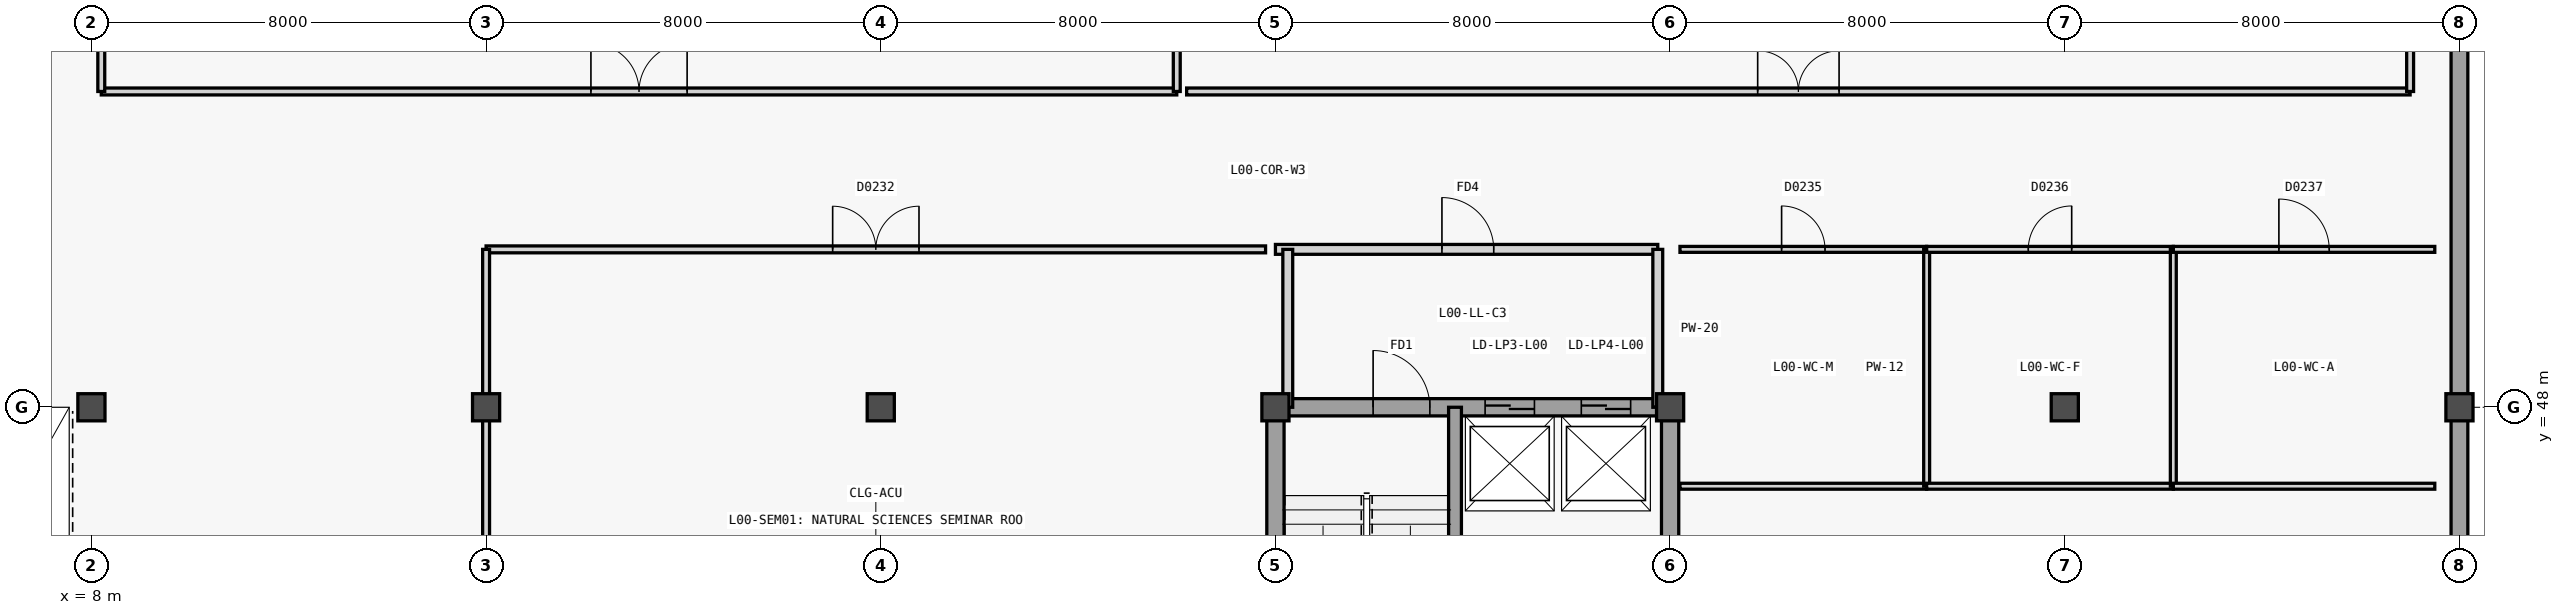
"""IFC4 building model, lengths in metres.
Left out: names, types, materials, properties, quantities, classifications, styles, units other than length and angle.
Written with IfcOpenShell. Run it as: python <this file> out.ifc"""

import sys

from ifc_helpers import new_model, si_unit, direction, frame, frame_2d, origin, origin_2d, place, context, subcontext, project, spatial, rectangle, extrude, element, fill, save


model = new_model("IFC4")
c1 = context("Model", 3, precision=1e-05, world=origin(), true_north=direction((0.0, 1.0)))
c2 = subcontext(c1, "Body", "Model", "MODEL_VIEW")
j1 = project(units=[si_unit("LENGTHUNIT", "METRE"), si_unit("PLANEANGLEUNIT", "RADIAN")], contexts=[c1])
p1 = place(None, origin())
s1 = spatial("IfcSite", under=j1, at=p1, CompositionType="ELEMENT")
p2 = place(p1, origin())
s2 = spatial("IfcBuilding", under=s1, at=p2, CompositionType="ELEMENT")
p3 = place(p2, origin())
s3 = spatial("IfcBuildingStorey", under=s2, at=p3, CompositionType="ELEMENT", Elevation=0.0)
for number, where, z_axis, x_axis in (
    (1, (8.0, 48.0, 0.0), (0.0, 0.0, 1.0), (1.0, 0.0, 0.0)),
    (2, (16.0, 48.0, 0.0), (0.0, 0.0, 1.0), (1.0, 0.0, 0.0)),
    (3, (24.0, 48.0, 0.0), (0.0, 0.0, 1.0), (1.0, 0.0, 0.0)),
    (4, (32.0, 48.0, 0.0), (0.0, 0.0, 1.0), (1.0, 0.0, 0.0)),
    (5, (40.0, 48.0, 0.0), (0.0, 0.0, 1.0), (1.0, 0.0, 0.0)),
    (6, (48.0, 48.0, 0.0), (0.0, 0.0, 1.0), (1.0, 0.0, 0.0)),
    (7, (56.0, 48.0, 0.0), (0.0, 0.0, 1.0), (1.0, 0.0, 0.0)),
):
    element("IfcColumn", number, at=place(p3, frame(where, z_axis=z_axis, x_axis=x_axis)), inside=s3, PredefinedType="COLUMN", context=c2, shape_type="SweptSolid", body=[
        extrude(rectangle(XDim=0.55, YDim=0.55, at=origin_2d()), origin(), (0.0, 0.0, 1.0), 5.4),
    ])
p4 = place(p3, frame((56.0, 64.0, 0.0), z_axis=(0.0, 0.0, 1.0), x_axis=(0.0, -1.0, 0.0)))
e8 = element("IfcWall", 8, at=p4, inside=s3, PredefinedType="SOLIDWALL", context=c2, shape_type="SweptSolid", body=[
    extrude(rectangle(XDim=64.0, YDim=0.34, at=frame_2d((32.0, 0.0))), origin(), (0.0, 0.0, 1.0), 5.16),
])
for number, where, z_axis, x_axis in (
    (9, (32.0, 40.0, 0.0), (0.0, 0.0, 1.0), (0.0, 1.0, 0.0)),
    (10, (40.0, 40.0, 0.0), (0.0, 0.0, 1.0), (0.0, 1.0, 0.0)),
):
    element("IfcWall", number, at=place(p3, frame(where, z_axis=z_axis, x_axis=x_axis)), inside=s3, PredefinedType="SHEAR", context=c2, shape_type="SweptSolid", body=[
        extrude(rectangle(XDim=8.0, YDim=0.35, at=frame_2d((4.0, 0.0))), origin(), (0.0, 0.0, 1.0), 5.4),
    ])
p5 = place(p3, frame((32.0, 48.0, 0.0), z_axis=(0.0, 0.0, 1.0), x_axis=(1.0, 0.0, 0.0)))
e11 = element("IfcWall", 11, at=p5, inside=s3, PredefinedType="SHEAR", context=c2, shape_type="SweptSolid", body=[
    extrude(rectangle(XDim=8.0, YDim=0.35, at=frame_2d((4.0, 0.0))), origin(), (0.0, 0.0, 1.0), 5.4),
])
p6 = place(p5, frame((1.98, 0.0, 0.0)))
e12 = element("IfcOpeningElement", 12, at=p6, cuts=e11, PredefinedType="OPENING", context=c2, shape_type="SweptSolid", body=[
    extrude(rectangle(XDim=1.15, YDim=2.2, at=frame_2d((0.575, 1.1))), frame((0.0, 0.185, 0.0), z_axis=(0.0, -1.0, 0.0), x_axis=(1.0, 0.0, 0.0)), (0.0, 0.0, 1.0), 0.37),
])
p7 = place(p5, frame((4.25, 0.0, 0.0)))
e13 = element("IfcOpeningElement", 13, at=p7, cuts=e11, PredefinedType="OPENING", context=c2, shape_type="SweptSolid", body=[
    extrude(rectangle(XDim=1.0, YDim=2.15, at=frame_2d((0.5, 1.075))), frame((0.0, 0.185, 0.0), z_axis=(0.0, -1.0, 0.0), x_axis=(1.0, 0.0, 0.0)), (0.0, 0.0, 1.0), 0.37),
])
p8 = place(p5, frame((6.2, 0.0, 0.0)))
e14 = element("IfcOpeningElement", 14, at=p8, cuts=e11, PredefinedType="OPENING", context=c2, shape_type="SweptSolid", body=[
    extrude(rectangle(XDim=1.0, YDim=2.15, at=frame_2d((0.5, 1.075))), frame((0.0, 0.185, 0.0), z_axis=(0.0, -1.0, 0.0), x_axis=(1.0, 0.0, 0.0)), (0.0, 0.0, 1.0), 0.37),
])
p9 = place(p3, frame((35.64, 40.0, 0.0), z_axis=(0.0, 0.0, 1.0), x_axis=(0.0, 1.0, 0.0)))
e15 = element("IfcWall", 15, at=p9, inside=s3, PredefinedType="SHEAR", context=c2, shape_type="SweptSolid", body=[
    extrude(rectangle(XDim=8.0, YDim=0.26, at=frame_2d((4.0, 0.0))), origin(), (0.0, 0.0, 1.0), 5.4),
])
p10 = place(p3, frame((32.0, 51.2, 0.0), z_axis=(0.0, 0.0, 1.0), x_axis=(1.0, 0.0, 0.0)))
e16 = element("IfcWall", 16, at=p10, inside=s3, PredefinedType="PARTITIONING", context=c2, shape_type="SweptSolid", body=[
    extrude(rectangle(XDim=7.75, YDim=0.2, at=frame_2d((3.875, 0.0))), origin(), (0.0, 0.0, 1.0), 5.12),
])
p11 = place(p10, frame((3.375, 0.0, 0.0)))
e17 = element("IfcOpeningElement", 17, at=p11, cuts=e16, PredefinedType="OPENING", context=c2, shape_type="SweptSolid", body=[
    extrude(rectangle(XDim=1.05, YDim=2.15, at=frame_2d((0.525, 1.075))), frame((0.0, 0.11, 0.0), z_axis=(0.0, -1.0, 0.0), x_axis=(1.0, 0.0, 0.0)), (0.0, 0.0, 1.0), 0.22),
])
for number, where, z_axis, x_axis in (
    (18, (39.75, 48.0, 0.0), (0.0, 0.0, 1.0), (0.0, 1.0, 0.0)),
    (19, (32.25, 48.0, 0.0), (0.0, 0.0, 1.0), (0.0, 1.0, 0.0)),
):
    element("IfcWall", number, at=place(p3, frame(where, z_axis=z_axis, x_axis=x_axis)), inside=s3, PredefinedType="PARTITIONING", context=c2, shape_type="SweptSolid", body=[
        extrude(rectangle(XDim=3.2, YDim=0.2, at=frame_2d((1.6, 0.0))), origin(), (0.0, 0.0, 1.0), 4.47),
    ])
p12 = place(p3, frame((16.0, 51.2, 0.0), z_axis=(0.0, 0.0, 1.0), x_axis=(1.0, 0.0, 0.0)))
e20 = element("IfcWall", 20, at=p12, inside=s3, PredefinedType="PARTITIONING", context=c2, shape_type="SweptSolid", body=[
    extrude(rectangle(XDim=15.8, YDim=0.14, at=frame_2d((7.9, 0.0))), origin(), (0.0, 0.0, 1.0), 5.14),
])
p13 = place(p12, frame((7.025, 0.0, 0.0)))
e21 = element("IfcOpeningElement", 21, at=p13, cuts=e20, PredefinedType="OPENING", context=c2, shape_type="SweptSolid", body=[
    extrude(rectangle(XDim=1.75, YDim=2.2, at=frame_2d((0.875, 1.1))), frame((0.0, 0.08, 0.0), z_axis=(0.0, -1.0, 0.0), x_axis=(1.0, 0.0, 0.0)), (0.0, 0.0, 1.0), 0.16),
])
p14 = place(p3, frame((16.0, 40.2, 0.0), z_axis=(0.0, 0.0, 1.0), x_axis=(0.0, 1.0, 0.0)))
e22 = element("IfcWall", 22, at=p14, inside=s3, PredefinedType="PARTITIONING", context=c2, shape_type="SweptSolid", body=[
    extrude(rectangle(XDim=11.0, YDim=0.14, at=frame_2d((5.5, 0.0))), origin(), (0.0, 0.0, 1.0), 4.47),
])
p15 = place(p3, frame((8.2, 54.4, 0.0), z_axis=(0.0, 0.0, 1.0), x_axis=(1.0, 0.0, 0.0)))
e23 = element("IfcWall", 23, at=p15, inside=s3, PredefinedType="PARTITIONING", context=c2, shape_type="SweptSolid", body=[
    extrude(rectangle(XDim=21.8, YDim=0.14, at=frame_2d((10.9, 0.0))), origin(), (0.0, 0.0, 1.0), 5.14),
])
p16 = place(p15, frame((9.925, 0.0, 0.0)))
e24 = element("IfcOpeningElement", 24, at=p16, cuts=e23, PredefinedType="OPENING", context=c2, shape_type="SweptSolid", body=[
    extrude(rectangle(XDim=1.95, YDim=2.35, at=frame_2d((0.975, 1.175))), frame((0.0, 0.08, 0.0), z_axis=(0.0, -1.0, 0.0), x_axis=(1.0, 0.0, 0.0)), (0.0, 0.0, 1.0), 0.16),
])
p17 = place(p3, frame((8.2, 54.4, 0.0), z_axis=(0.0, 0.0, 1.0), x_axis=(0.0, 1.0, 0.0)))
e25 = element("IfcWall", 25, at=p17, inside=s3, PredefinedType="PARTITIONING", context=c2, shape_type="SweptSolid", body=[
    extrude(rectangle(XDim=8.6, YDim=0.14, at=frame_2d((4.3, 0.0))), origin(), (0.0, 0.0, 1.0), 4.47),
])
p18 = place(p3, frame((30.0, 54.4, 0.0), z_axis=(0.0, 0.0, 1.0), x_axis=(0.0, 1.0, 0.0)))
e26 = element("IfcWall", 26, at=p18, inside=s3, PredefinedType="PARTITIONING", context=c2, shape_type="SweptSolid", body=[
    extrude(rectangle(XDim=8.6, YDim=0.14, at=frame_2d((4.3, 0.0))), origin(), (0.0, 0.0, 1.0), 5.14),
])
p19 = place(p3, frame((30.2, 54.4, 0.0), z_axis=(0.0, 0.0, 1.0), x_axis=(1.0, 0.0, 0.0)))
e27 = element("IfcWall", 27, at=p19, inside=s3, PredefinedType="PARTITIONING", context=c2, shape_type="SweptSolid", body=[
    extrude(rectangle(XDim=24.8, YDim=0.14, at=frame_2d((12.4, 0.0))), origin(), (0.0, 0.0, 1.0), 5.14),
])
p20 = place(p19, frame((11.575, 0.0, 0.0)))
e28 = element("IfcOpeningElement", 28, at=p20, cuts=e27, PredefinedType="OPENING", context=c2, shape_type="SweptSolid", body=[
    extrude(rectangle(XDim=1.65, YDim=2.3, at=frame_2d((0.825, 1.15))), frame((0.0, 0.08, 0.0), z_axis=(0.0, -1.0, 0.0), x_axis=(1.0, 0.0, 0.0)), (0.0, 0.0, 1.0), 0.16),
])
p21 = place(p3, frame((55.0, 54.4, 0.0), z_axis=(0.0, 0.0, 1.0), x_axis=(0.0, 1.0, 0.0)))
e29 = element("IfcWall", 29, at=p21, inside=s3, PredefinedType="PARTITIONING", context=c2, shape_type="SweptSolid", body=[
    extrude(rectangle(XDim=8.6, YDim=0.14, at=frame_2d((4.3, 0.0))), origin(), (0.0, 0.0, 1.0), 5.14),
])
p22 = place(p3, frame((40.2, 46.4, 0.0), z_axis=(0.0, 0.0, 1.0), x_axis=(1.0, 0.0, 0.0)))
e30 = element("IfcWall", 30, at=p22, inside=s3, PredefinedType="PARTITIONING", context=c2, shape_type="SweptSolid", body=[
    extrude(rectangle(XDim=5.0, YDim=0.12, at=frame_2d((2.5, 0.0))), origin(), (0.0, 0.0, 1.0), 5.14),
])
p23 = place(p3, frame((40.2, 51.2, 0.0), z_axis=(0.0, 0.0, 1.0), x_axis=(1.0, 0.0, 0.0)))
e31 = element("IfcWall", 31, at=p23, inside=s3, PredefinedType="PARTITIONING", context=c2, shape_type="SweptSolid", body=[
    extrude(rectangle(XDim=5.0, YDim=0.12, at=frame_2d((2.5, 0.0))), origin(), (0.0, 0.0, 1.0), 5.14),
])
p24 = place(p23, frame((2.06, 0.0, 0.0)))
e32 = element("IfcOpeningElement", 32, at=p24, cuts=e31, PredefinedType="OPENING", context=c2, shape_type="SweptSolid", body=[
    extrude(rectangle(XDim=0.88, YDim=2.1, at=frame_2d((0.44, 1.05))), frame((0.0, 0.07, 0.0), z_axis=(0.0, -1.0, 0.0), x_axis=(1.0, 0.0, 0.0)), (0.0, 0.0, 1.0), 0.14),
])
p25 = place(p3, frame((45.2, 46.4, 0.0), z_axis=(0.0, 0.0, 1.0), x_axis=(0.0, 1.0, 0.0)))
e33 = element("IfcWall", 33, at=p25, inside=s3, PredefinedType="PARTITIONING", context=c2, shape_type="SweptSolid", body=[
    extrude(rectangle(XDim=4.8, YDim=0.12, at=frame_2d((2.4, 0.0))), origin(), (0.0, 0.0, 1.0), 5.14),
])
p26 = place(p3, frame((45.2, 46.4, 0.0), z_axis=(0.0, 0.0, 1.0), x_axis=(1.0, 0.0, 0.0)))
e34 = element("IfcWall", 34, at=p26, inside=s3, PredefinedType="PARTITIONING", context=c2, shape_type="SweptSolid", body=[
    extrude(rectangle(XDim=5.0, YDim=0.12, at=frame_2d((2.5, 0.0))), origin(), (0.0, 0.0, 1.0), 5.14),
])
p27 = place(p3, frame((45.2, 51.2, 0.0), z_axis=(0.0, 0.0, 1.0), x_axis=(1.0, 0.0, 0.0)))
e35 = element("IfcWall", 35, at=p27, inside=s3, PredefinedType="PARTITIONING", context=c2, shape_type="SweptSolid", body=[
    extrude(rectangle(XDim=5.0, YDim=0.12, at=frame_2d((2.5, 0.0))), origin(), (0.0, 0.0, 1.0), 5.14),
])
p28 = place(p27, frame((2.06, 0.0, 0.0)))
e36 = element("IfcOpeningElement", 36, at=p28, cuts=e35, PredefinedType="OPENING", context=c2, shape_type="SweptSolid", body=[
    extrude(rectangle(XDim=0.88, YDim=2.1, at=frame_2d((0.44, 1.05))), frame((0.0, 0.07, 0.0), z_axis=(0.0, -1.0, 0.0), x_axis=(1.0, 0.0, 0.0)), (0.0, 0.0, 1.0), 0.14),
])
p29 = place(p3, frame((50.2, 46.4, 0.0), z_axis=(0.0, 0.0, 1.0), x_axis=(0.0, 1.0, 0.0)))
e37 = element("IfcWall", 37, at=p29, inside=s3, PredefinedType="PARTITIONING", context=c2, shape_type="SweptSolid", body=[
    extrude(rectangle(XDim=4.8, YDim=0.12, at=frame_2d((2.4, 0.0))), origin(), (0.0, 0.0, 1.0), 5.14),
])
p30 = place(p3, frame((50.2, 46.4, 0.0), z_axis=(0.0, 0.0, 1.0), x_axis=(1.0, 0.0, 0.0)))
e38 = element("IfcWall", 38, at=p30, inside=s3, PredefinedType="PARTITIONING", context=c2, shape_type="SweptSolid", body=[
    extrude(rectangle(XDim=5.3, YDim=0.12, at=frame_2d((2.65, 0.0))), origin(), (0.0, 0.0, 1.0), 5.14),
])
p31 = place(p3, frame((50.2, 51.2, 0.0), z_axis=(0.0, 0.0, 1.0), x_axis=(1.0, 0.0, 0.0)))
e39 = element("IfcWall", 39, at=p31, inside=s3, PredefinedType="PARTITIONING", context=c2, shape_type="SweptSolid", body=[
    extrude(rectangle(XDim=5.3, YDim=0.12, at=frame_2d((2.65, 0.0))), origin(), (0.0, 0.0, 1.0), 5.14),
])
p32 = place(p31, frame((2.14, 0.0, 0.0)))
e40 = element("IfcOpeningElement", 40, at=p32, cuts=e39, PredefinedType="OPENING", context=c2, shape_type="SweptSolid", body=[
    extrude(rectangle(XDim=1.02, YDim=2.1, at=frame_2d((0.51, 1.05))), frame((0.0, 0.07, 0.0), z_axis=(0.0, -1.0, 0.0), x_axis=(1.0, 0.0, 0.0)), (0.0, 0.0, 1.0), 0.14),
])
p33 = place(p6, origin())
e41 = element("IfcDoor", 41, at=p33, inside=s3, OperationType="SINGLE_SWING_LEFT", PredefinedType="DOOR", context=c2, shape_type="SweptSolid", body=[
    extrude(rectangle(XDim=1.15, YDim=2.2, at=frame_2d((0.575, 1.1))), frame((0.0, 0.025, 0.0), z_axis=(0.0, -1.0, 0.0), x_axis=(1.0, 0.0, 0.0)), (0.0, 0.0, 1.0), 0.05),
])
fill(e12, e41)
p34 = place(p7, origin())
e42 = element("IfcDoor", 42, at=p34, inside=s3, OperationType="DOUBLE_DOOR_SLIDING", PredefinedType="DOOR", context=c2, shape_type="SweptSolid", body=[
    extrude(rectangle(XDim=1.0, YDim=2.15, at=frame_2d((0.5, 1.075))), frame((0.0, 0.025, 0.0), z_axis=(0.0, -1.0, 0.0), x_axis=(1.0, 0.0, 0.0)), (0.0, 0.0, 1.0), 0.05),
])
fill(e13, e42)
p35 = place(p8, origin())
e43 = element("IfcDoor", 43, at=p35, inside=s3, OperationType="DOUBLE_DOOR_SLIDING", PredefinedType="DOOR", context=c2, shape_type="SweptSolid", body=[
    extrude(rectangle(XDim=1.0, YDim=2.15, at=frame_2d((0.5, 1.075))), frame((0.0, 0.025, 0.0), z_axis=(0.0, -1.0, 0.0), x_axis=(1.0, 0.0, 0.0)), (0.0, 0.0, 1.0), 0.05),
])
fill(e14, e43)
p36 = place(p11, origin())
e44 = element("IfcDoor", 44, at=p36, inside=s3, OperationType="SINGLE_SWING_LEFT", PredefinedType="DOOR", context=c2, shape_type="SweptSolid", body=[
    extrude(rectangle(XDim=1.05, YDim=2.15, at=frame_2d((0.525, 1.075))), frame((0.0, 0.025, 0.0), z_axis=(0.0, -1.0, 0.0), x_axis=(1.0, 0.0, 0.0)), (0.0, 0.0, 1.0), 0.05),
])
fill(e17, e44)
p37 = place(p13, origin())
e45 = element("IfcDoor", 45, at=p37, inside=s3, OperationType="DOUBLE_DOOR_SINGLE_SWING", PredefinedType="DOOR", context=c2, shape_type="SweptSolid", body=[
    extrude(rectangle(XDim=1.75, YDim=2.2, at=frame_2d((0.875, 1.1))), frame((0.0, 0.025, 0.0), z_axis=(0.0, -1.0, 0.0), x_axis=(1.0, 0.0, 0.0)), (0.0, 0.0, 1.0), 0.05),
])
fill(e21, e45)
p38 = place(p16, origin())
e46 = element("IfcDoor", 46, at=p38, inside=s3, OperationType="DOUBLE_DOOR_SINGLE_SWING", PredefinedType="DOOR", context=c2, shape_type="SweptSolid", body=[
    extrude(rectangle(XDim=1.95, YDim=2.35, at=frame_2d((0.975, 1.175))), frame((0.0, 0.025, 0.0), z_axis=(0.0, -1.0, 0.0), x_axis=(1.0, 0.0, 0.0)), (0.0, 0.0, 1.0), 0.05),
])
fill(e24, e46)
p39 = place(p20, origin())
e47 = element("IfcDoor", 47, at=p39, inside=s3, OperationType="DOUBLE_DOOR_SINGLE_SWING", PredefinedType="DOOR", context=c2, shape_type="SweptSolid", body=[
    extrude(rectangle(XDim=1.65, YDim=2.3, at=frame_2d((0.825, 1.15))), frame((0.0, 0.025, 0.0), z_axis=(0.0, -1.0, 0.0), x_axis=(1.0, 0.0, 0.0)), (0.0, 0.0, 1.0), 0.05),
])
fill(e28, e47)
p40 = place(p24, origin())
e48 = element("IfcDoor", 48, at=p40, inside=s3, OperationType="SINGLE_SWING_LEFT", PredefinedType="DOOR", context=c2, shape_type="SweptSolid", body=[
    extrude(rectangle(XDim=0.88, YDim=2.1, at=frame_2d((0.44, 1.05))), frame((0.0, 0.025, 0.0), z_axis=(0.0, -1.0, 0.0), x_axis=(1.0, 0.0, 0.0)), (0.0, 0.0, 1.0), 0.05),
])
fill(e32, e48)
p41 = place(p28, origin())
e49 = element("IfcDoor", 49, at=p41, inside=s3, OperationType="SINGLE_SWING_RIGHT", PredefinedType="DOOR", context=c2, shape_type="SweptSolid", body=[
    extrude(rectangle(XDim=0.88, YDim=2.1, at=frame_2d((0.44, 1.05))), frame((0.0, 0.025, 0.0), z_axis=(0.0, -1.0, 0.0), x_axis=(1.0, 0.0, 0.0)), (0.0, 0.0, 1.0), 0.05),
])
fill(e36, e49)
p42 = place(p32, origin())
e50 = element("IfcDoor", 50, at=p42, inside=s3, OperationType="SINGLE_SWING_LEFT", PredefinedType="DOOR", context=c2, shape_type="SweptSolid", body=[
    extrude(rectangle(XDim=1.02, YDim=2.1, at=frame_2d((0.51, 1.05))), frame((0.0, 0.025, 0.0), z_axis=(0.0, -1.0, 0.0), x_axis=(1.0, 0.0, 0.0)), (0.0, 0.0, 1.0), 0.05),
])
fill(e40, e50)
save(model, sys.argv[1])
